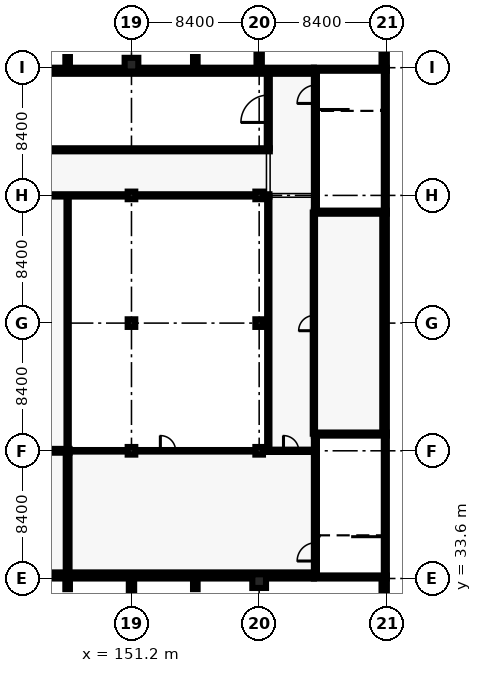
"""IFC4 building model, lengths in metres.
Left out: names, types, materials, properties, quantities, classifications, styles, units other than length and angle.
Written with IfcOpenShell. Run it as: python <this file> out.ifc"""

import sys

from ifc_helpers import new_model, si_unit, direction, frame, frame_2d, origin, origin_2d, place, context, subcontext, project, spatial, rectangle, extrude, element, fill, save


model = new_model("IFC4")
c1 = context("Model", 3, precision=1e-05, world=origin(), true_north=direction((0.0, 1.0)))
c2 = subcontext(c1, "Body", "Model", "MODEL_VIEW")
j1 = project(units=[si_unit("LENGTHUNIT", "METRE"), si_unit("PLANEANGLEUNIT", "RADIAN")], contexts=[c1])
p1 = place(None, origin())
s1 = spatial("IfcSite", under=j1, at=p1, CompositionType="ELEMENT")
p2 = place(p1, origin())
s2 = spatial("IfcBuilding", under=s1, at=p2, CompositionType="ELEMENT")
p3 = place(p2, frame((0.0, 0.0, 10.2)))
s3 = spatial("IfcBuildingStorey", under=s2, at=p3, CompositionType="ELEMENT", Elevation=10.2)
for number, where, z_axis, x_axis in (
    (1, (168.0, 33.7, 0.0), (0.0, 0.0, 1.0), (-1.0, 0.0, 0.0)),
    (2, (163.2, 43.1, 0.0), (0.0, 0.0, 1.0), (1.0, 0.0, 0.0)),
):
    element("IfcWall", number, at=place(p3, frame(where, z_axis=z_axis, x_axis=x_axis)), inside=s3, PredefinedType="SHEAR", context=c2, shape_type="SweptSolid", body=[
        extrude(rectangle(XDim=4.8, YDim=0.2, at=frame_2d((2.4, 0.0))), origin(), (0.0, 0.0, 1.0), 4.8),
    ])
p4 = place(p3, frame((163.3, 33.8, 0.0), z_axis=(0.0, 0.0, 1.0), x_axis=(0.0, 1.0, 0.0)))
e3 = element("IfcWall", 3, at=p4, inside=s3, PredefinedType="SHEAR", context=c2, shape_type="SweptSolid", body=[
    extrude(rectangle(XDim=9.2, YDim=0.2, at=frame_2d((4.6, 0.0))), origin(), (0.0, 0.0, 1.0), 4.8),
])
p5 = place(p4, frame((0.95, 0.0, 0.0)))
e4 = element("IfcOpeningElement", 4, at=p5, cuts=e3, PredefinedType="OPENING", context=c2, shape_type="SweptSolid", body=[
    extrude(rectangle(XDim=1.2, YDim=2.1, at=frame_2d((0.6, 1.05))), frame((0.0, 0.11, 0.0), z_axis=(0.0, -1.0, 0.0), x_axis=(1.0, 0.0, 0.0)), (0.0, 0.0, 1.0), 0.22),
])
p6 = place(p3, frame((167.9, 43.0, 0.0), z_axis=(0.0, 0.0, 1.0), x_axis=(0.0, -1.0, 0.0)))
e5 = element("IfcWall", 5, at=p6, inside=s3, PredefinedType="SHEAR", context=c2, shape_type="SweptSolid", body=[
    extrude(rectangle(XDim=9.2, YDim=0.2, at=frame_2d((4.6, 0.0))), origin(), (0.0, 0.0, 1.0), 4.8),
])
for number, where, z_axis, x_axis in (
    (6, (168.0, 57.7, 0.0), (0.0, 0.0, 1.0), (-1.0, 0.0, 0.0)),
    (7, (163.2, 67.1, 0.0), (0.0, 0.0, 1.0), (1.0, 0.0, 0.0)),
):
    element("IfcWall", number, at=place(p3, frame(where, z_axis=z_axis, x_axis=x_axis)), inside=s3, PredefinedType="SHEAR", context=c2, shape_type="SweptSolid", body=[
        extrude(rectangle(XDim=4.8, YDim=0.2, at=frame_2d((2.4, 0.0))), origin(), (0.0, 0.0, 1.0), 4.8),
    ])
p7 = place(p3, frame((163.3, 57.8, 0.0), z_axis=(0.0, 0.0, 1.0), x_axis=(0.0, 1.0, 0.0)))
e8 = element("IfcWall", 8, at=p7, inside=s3, PredefinedType="SHEAR", context=c2, shape_type="SweptSolid", body=[
    extrude(rectangle(XDim=9.2, YDim=0.2, at=frame_2d((4.6, 0.0))), origin(), (0.0, 0.0, 1.0), 4.8),
])
p8 = place(p7, frame((7.05, 0.0, 0.0)))
e9 = element("IfcOpeningElement", 9, at=p8, cuts=e8, PredefinedType="OPENING", context=c2, shape_type="SweptSolid", body=[
    extrude(rectangle(XDim=1.2, YDim=2.1, at=frame_2d((0.6, 1.05))), frame((0.0, 0.11, 0.0), z_axis=(0.0, -1.0, 0.0), x_axis=(1.0, 0.0, 0.0)), (0.0, 0.0, 1.0), 0.22),
])
p9 = place(p3, frame((167.9, 67.0, 0.0), z_axis=(0.0, 0.0, 1.0), x_axis=(0.0, -1.0, 0.0)))
e10 = element("IfcWall", 10, at=p9, inside=s3, PredefinedType="SHEAR", context=c2, shape_type="SweptSolid", body=[
    extrude(rectangle(XDim=9.2, YDim=0.2, at=frame_2d((4.6, 0.0))), origin(), (0.0, 0.0, 1.0), 4.8),
])
p10 = place(p3, frame((167.85, 57.6, 0.0), z_axis=(0.0, 0.0, 1.0), x_axis=(0.0, -1.0, 0.0)))
e11 = element("IfcWall", 11, at=p10, inside=s3, PredefinedType="SOLIDWALL", context=c2, shape_type="SweptSolid", body=[
    extrude(rectangle(XDim=14.4, YDim=0.3, at=frame_2d((7.2, 0.0))), origin(), (0.0, 0.0, 1.0), 4.8),
])
p11 = place(p3, frame((163.2, 33.8, 0.0), z_axis=(0.0, 0.0, 1.0), x_axis=(-1.0, 0.0, 0.0)))
e12 = element("IfcWall", 12, at=p11, inside=s3, PredefinedType="SHEAR", context=c2, shape_type="SweptSolid", body=[
    extrude(rectangle(XDim=40.8, YDim=0.4, at=frame_2d((20.4, 0.0))), origin(), (0.0, 0.0, 1.0), 4.8),
])
p12 = place(p3, frame((125.4, 67.0, 0.0), z_axis=(0.0, 0.0, 1.0), x_axis=(1.0, 0.0, 0.0)))
e13 = element("IfcWall", 13, at=p12, inside=s3, PredefinedType="SHEAR", context=c2, shape_type="SweptSolid", body=[
    extrude(rectangle(XDim=37.8, YDim=0.4, at=frame_2d((18.9, 0.0))), origin(), (0.0, 0.0, 1.0), 4.8),
])
for number, where, z_axis, x_axis in (
    (14, (151.2, 42.0, 0.0), (0.0, 0.0, 1.0), (1.0, 0.0, 0.0)),
    (15, (151.2, 50.4, 0.0), (0.0, 0.0, 1.0), (1.0, 0.0, 0.0)),
    (16, (151.2, 58.8, 0.0), (0.0, 0.0, 1.0), (1.0, 0.0, 0.0)),
    (17, (159.6, 42.0, 0.0), (0.0, 0.0, 1.0), (1.0, 0.0, 0.0)),
    (18, (159.6, 50.4, 0.0), (0.0, 0.0, 1.0), (1.0, 0.0, 0.0)),
    (19, (159.6, 58.8, 0.0), (0.0, 0.0, 1.0), (1.0, 0.0, 0.0)),
):
    element("IfcColumn", number, at=place(p3, frame(where, z_axis=z_axis, x_axis=x_axis)), inside=s3, PredefinedType="COLUMN", context=c2, shape_type="SweptSolid", body=[
        extrude(rectangle(XDim=0.5, YDim=0.5, at=origin_2d()), origin(), (0.0, 0.0, 1.0), 4.8),
    ])
for number, where, z_axis, x_axis in (
    (20, (159.6, 33.427, 3.8), (0.0, 0.0, 1.0), (1.0, 0.0, 0.0)),
    (21, (151.2, 67.4, 3.8), (0.0, 0.0, 1.0), (1.0, 0.0, 0.0)),
):
    element("IfcColumn", number, at=place(p3, frame(where, z_axis=z_axis, x_axis=x_axis)), inside=s3, PredefinedType="COLUMN", context=c2, shape_type="SweptSolid", body=[
        extrude(rectangle(XDim=0.9, YDim=0.9, at=origin_2d()), origin(), (0.0, 0.0, 1.0), 1.0),
    ])
p13 = place(p3, frame((147.0, 33.25, 0.0), z_axis=(0.0, 0.0, 1.0), x_axis=(1.0, 0.0, 0.0)))
e22 = element("IfcColumn", 22, at=p13, inside=s3, PredefinedType="PILASTER", context=c2, shape_type="SweptSolid", body=[
    extrude(rectangle(XDim=0.3, YDim=0.7, at=origin_2d()), origin(), (0.0, 0.0, 1.0), 4.8),
])
p14 = place(p3, frame((151.2, 33.15, 0.0), z_axis=(0.0, 0.0, 1.0), x_axis=(1.0, 0.0, 0.0)))
e23 = element("IfcColumn", 23, at=p14, inside=s3, PredefinedType="PILASTER", context=c2, shape_type="SweptSolid", body=[
    extrude(rectangle(XDim=0.35, YDim=0.9, at=origin_2d()), origin(), (0.0, 0.0, 1.0), 4.8),
])
p15 = place(p3, frame((155.4, 33.25, 0.0), z_axis=(0.0, 0.0, 1.0), x_axis=(1.0, 0.0, 0.0)))
e24 = element("IfcColumn", 24, at=p15, inside=s3, PredefinedType="PILASTER", context=c2, shape_type="SweptSolid", body=[
    extrude(rectangle(XDim=0.3, YDim=0.7, at=origin_2d()), origin(), (0.0, 0.0, 1.0), 4.8),
])
p16 = place(p3, frame((167.825, 33.15, 0.0), z_axis=(0.0, 0.0, 1.0), x_axis=(1.0, 0.0, 0.0)))
e25 = element("IfcColumn", 25, at=p16, inside=s3, PredefinedType="PILASTER", context=c2, shape_type="SweptSolid", body=[
    extrude(rectangle(XDim=0.35, YDim=0.9, at=origin_2d()), origin(), (0.0, 0.0, 1.0), 4.8),
])
for number, where, z_axis, x_axis in (
    (26, (147.0, 67.55, 0.0), (0.0, 0.0, 1.0), (1.0, 0.0, 0.0)),
    (27, (155.4, 67.55, 0.0), (0.0, 0.0, 1.0), (1.0, 0.0, 0.0)),
):
    element("IfcColumn", number, at=place(p3, frame(where, z_axis=z_axis, x_axis=x_axis)), inside=s3, PredefinedType="PILASTER", context=c2, shape_type="SweptSolid", body=[
        extrude(rectangle(XDim=0.3, YDim=0.7, at=origin_2d()), origin(), (0.0, 0.0, 1.0), 4.8),
    ])
for number, where, z_axis, x_axis in (
    (28, (159.6, 67.65, 0.0), (0.0, 0.0, 1.0), (1.0, 0.0, 0.0)),
    (29, (167.825, 67.65, 0.0), (0.0, 0.0, 1.0), (1.0, 0.0, 0.0)),
):
    element("IfcColumn", number, at=place(p3, frame(where, z_axis=z_axis, x_axis=x_axis)), inside=s3, PredefinedType="PILASTER", context=c2, shape_type="SweptSolid", body=[
        extrude(rectangle(XDim=0.35, YDim=0.9, at=origin_2d()), origin(), (0.0, 0.0, 1.0), 4.8),
    ])
p17 = place(p3, frame((125.875, 42.0, 0.0), z_axis=(0.0, 0.0, 1.0), x_axis=(1.0, 0.0, 0.0)))
e30 = element("IfcWall", 30, at=p17, inside=s3, PredefinedType="PARTITIONING", context=c2, shape_type="SweptSolid", body=[
    extrude(rectangle(XDim=21.25, YDim=0.25, at=frame_2d((10.625, 0.0))), origin(), (0.0, 0.0, 1.0), 4.5),
])
p18 = place(p3, frame((147.0, 34.0, 0.0), z_axis=(0.0, 0.0, 1.0), x_axis=(0.0, 1.0, 0.0)))
e31 = element("IfcWall", 31, at=p18, inside=s3, PredefinedType="PARTITIONING", context=c2, shape_type="SweptSolid", body=[
    extrude(rectangle(XDim=7.875, YDim=0.25, at=frame_2d((3.938, 0.0))), origin(), (0.0, 0.0, 1.0), 4.5),
])
p19 = place(p3, frame((125.9, 61.8, 0.0), z_axis=(0.0, 0.0, 1.0), x_axis=(1.0, 0.0, 0.0)))
e32 = element("IfcWall", 32, at=p19, inside=s3, PredefinedType="SOLIDWALL", context=c2, shape_type="SweptSolid", body=[
    extrude(rectangle(XDim=34.4, YDim=0.2, at=frame_2d((17.2, 0.0))), origin(), (0.0, 0.0, 1.0), 4.5),
])
p20 = place(p3, frame((160.2, 61.9, 0.0), z_axis=(0.0, 0.0, 1.0), x_axis=(0.0, 1.0, 0.0)))
e33 = element("IfcWall", 33, at=p20, inside=s3, PredefinedType="SOLIDWALL", context=c2, shape_type="SweptSolid", body=[
    extrude(rectangle(XDim=4.9, YDim=0.2, at=frame_2d((2.45, 0.0))), origin(), (0.0, 0.0, 1.0), 4.5),
])
p21 = place(p20, frame((1.7, 0.0, 0.0)))
e34 = element("IfcOpeningElement", 34, at=p21, cuts=e33, PredefinedType="OPENING", context=c2, shape_type="SweptSolid", body=[
    extrude(rectangle(XDim=1.8, YDim=2.1, at=frame_2d((0.9, 1.05))), frame((0.0, 0.11, 0.0), z_axis=(0.0, -1.0, 0.0), x_axis=(1.0, 0.0, 0.0)), (0.0, 0.0, 1.0), 0.22),
])
p22 = place(p3, frame((160.125, 42.0, 0.0), z_axis=(0.0, 0.0, 1.0), x_axis=(1.0, 0.0, 0.0)))
e35 = element("IfcWall", 35, at=p22, inside=s3, PredefinedType="PARTITIONING", context=c2, shape_type="SweptSolid", body=[
    extrude(rectangle(XDim=3.075, YDim=0.15, at=frame_2d((1.538, 0.0))), origin(), (0.0, 0.0, 1.0), 4.5),
])
p23 = place(p22, frame((1.075, 0.0, 0.0)))
e36 = element("IfcOpeningElement", 36, at=p23, cuts=e35, PredefinedType="OPENING", context=c2, shape_type="SweptSolid", body=[
    extrude(rectangle(XDim=1.0, YDim=2.1, at=frame_2d((0.5, 1.05))), frame((0.0, 0.085, 0.0), z_axis=(0.0, -1.0, 0.0), x_axis=(1.0, 0.0, 0.0)), (0.0, 0.0, 1.0), 0.17),
])
p24 = place(p3, frame((125.925, 58.8, 0.0), z_axis=(0.0, 0.0, 1.0), x_axis=(1.0, 0.0, 0.0)))
e37 = element("IfcWall", 37, at=p24, inside=s3, PredefinedType="PARTITIONING", context=c2, shape_type="SweptSolid", body=[
    extrude(rectangle(XDim=34.35, YDim=0.15, at=frame_2d((17.175, 0.0))), origin(), (0.0, 0.0, 1.0), 4.5),
])
p25 = place(p24, frame((9.975, 0.0, 0.0)))
e38 = element("IfcOpeningElement", 38, at=p25, cuts=e37, PredefinedType="OPENING", context=c2, shape_type="SweptSolid", body=[
    extrude(rectangle(XDim=1.2, YDim=2.1, at=frame_2d((0.6, 1.05))), frame((0.0, 0.085, 0.0), z_axis=(0.0, -1.0, 0.0), x_axis=(1.0, 0.0, 0.0)), (0.0, 0.0, 1.0), 0.17),
])
p26 = place(p3, frame((147.0, 42.125, 0.0), z_axis=(0.0, 0.0, 1.0), x_axis=(0.0, 1.0, 0.0)))
e39 = element("IfcWall", 39, at=p26, inside=s3, PredefinedType="PARTITIONING", context=c2, shape_type="SweptSolid", body=[
    extrude(rectangle(XDim=16.6, YDim=0.15, at=frame_2d((8.3, 0.0))), origin(), (0.0, 0.0, 1.0), 4.5),
])
p27 = place(p3, frame((160.2, 42.075, 0.0), z_axis=(0.0, 0.0, 1.0), x_axis=(0.0, 1.0, 0.0)))
e40 = element("IfcWall", 40, at=p27, inside=s3, PredefinedType="PARTITIONING", context=c2, shape_type="SweptSolid", body=[
    extrude(rectangle(XDim=16.65, YDim=0.15, at=frame_2d((8.325, 0.0))), origin(), (0.0, 0.0, 1.0), 4.5),
])
p28 = place(p3, frame((163.2, 43.125, 0.0), z_axis=(0.0, 0.0, 1.0), x_axis=(0.0, 1.0, 0.0)))
e41 = element("IfcWall", 41, at=p28, inside=s3, PredefinedType="PARTITIONING", context=c2, shape_type="SweptSolid", body=[
    extrude(rectangle(XDim=14.55, YDim=0.15, at=frame_2d((7.275, 0.0))), origin(), (0.0, 0.0, 1.0), 4.5),
])
p29 = place(p28, frame((6.775, 0.0, 0.0)))
e42 = element("IfcOpeningElement", 42, at=p29, cuts=e41, PredefinedType="OPENING", context=c2, shape_type="SweptSolid", body=[
    extrude(rectangle(XDim=1.0, YDim=2.1, at=frame_2d((0.5, 1.05))), frame((0.0, 0.085, 0.0), z_axis=(0.0, -1.0, 0.0), x_axis=(1.0, 0.0, 0.0)), (0.0, 0.0, 1.0), 0.17),
])
p30 = place(p3, frame((147.125, 42.0, 0.0), z_axis=(0.0, 0.0, 1.0), x_axis=(1.0, 0.0, 0.0)))
e43 = element("IfcWall", 43, at=p30, inside=s3, PredefinedType="PARTITIONING", context=c2, shape_type="SweptSolid", body=[
    extrude(rectangle(XDim=13.0, YDim=0.1, at=frame_2d((6.5, 0.0))), origin(), (0.0, 0.0, 1.0), 4.5),
])
p31 = place(p30, frame((5.975, 0.0, 0.0)))
e44 = element("IfcOpeningElement", 44, at=p31, cuts=e43, PredefinedType="OPENING", context=c2, shape_type="SweptSolid", body=[
    extrude(rectangle(XDim=1.0, YDim=2.1, at=frame_2d((0.5, 1.05))), frame((0.0, 0.06, 0.0), z_axis=(0.0, -1.0, 0.0), x_axis=(1.0, 0.0, 0.0)), (0.0, 0.0, 1.0), 0.12),
])
p32 = place(p5, origin())
e45 = element("IfcDoor", 45, at=p32, inside=s3, OperationType="SINGLE_SWING_LEFT", PredefinedType="DOOR", context=c2, shape_type="SweptSolid", body=[
    extrude(rectangle(XDim=1.2, YDim=2.1, at=frame_2d((0.6, 1.05))), frame((0.0, 0.025, 0.0), z_axis=(0.0, -1.0, 0.0), x_axis=(1.0, 0.0, 0.0)), (0.0, 0.0, 1.0), 0.05),
])
fill(e4, e45)
p33 = place(p8, origin())
e46 = element("IfcDoor", 46, at=p33, inside=s3, OperationType="SINGLE_SWING_RIGHT", PredefinedType="DOOR", context=c2, shape_type="SweptSolid", body=[
    extrude(rectangle(XDim=1.2, YDim=2.1, at=frame_2d((0.6, 1.05))), frame((0.0, 0.025, 0.0), z_axis=(0.0, -1.0, 0.0), x_axis=(1.0, 0.0, 0.0)), (0.0, 0.0, 1.0), 0.05),
])
fill(e9, e46)
p34 = place(p31, origin())
e47 = element("IfcDoor", 47, at=p34, inside=s3, OperationType="SINGLE_SWING_RIGHT", PredefinedType="DOOR", context=c2, shape_type="SweptSolid", body=[
    extrude(rectangle(XDim=1.0, YDim=2.1, at=frame_2d((0.5, 1.05))), frame((0.0, 0.025, 0.0), z_axis=(0.0, -1.0, 0.0), x_axis=(1.0, 0.0, 0.0)), (0.0, 0.0, 1.0), 0.05),
])
fill(e44, e47)
p35 = place(p23, origin())
e48 = element("IfcDoor", 48, at=p35, inside=s3, OperationType="SINGLE_SWING_RIGHT", PredefinedType="DOOR", context=c2, shape_type="SweptSolid", body=[
    extrude(rectangle(XDim=1.0, YDim=2.1, at=frame_2d((0.5, 1.05))), frame((0.0, 0.025, 0.0), z_axis=(0.0, -1.0, 0.0), x_axis=(1.0, 0.0, 0.0)), (0.0, 0.0, 1.0), 0.05),
])
fill(e36, e48)
p36 = place(p21, origin())
e49 = element("IfcDoor", 49, at=p36, inside=s3, OperationType="DOUBLE_DOOR_SINGLE_SWING", PredefinedType="DOOR", context=c2, shape_type="SweptSolid", body=[
    extrude(rectangle(XDim=1.8, YDim=2.1, at=frame_2d((0.9, 1.05))), frame((0.0, 0.025, 0.0), z_axis=(0.0, -1.0, 0.0), x_axis=(1.0, 0.0, 0.0)), (0.0, 0.0, 1.0), 0.05),
])
fill(e34, e49)
p37 = place(p29, origin())
e50 = element("IfcDoor", 50, at=p37, inside=s3, OperationType="SINGLE_SWING_RIGHT", PredefinedType="DOOR", context=c2, shape_type="SweptSolid", body=[
    extrude(rectangle(XDim=1.0, YDim=2.1, at=frame_2d((0.5, 1.05))), frame((0.0, 0.025, 0.0), z_axis=(0.0, -1.0, 0.0), x_axis=(1.0, 0.0, 0.0)), (0.0, 0.0, 1.0), 0.05),
])
fill(e42, e50)
save(model, sys.argv[1])
